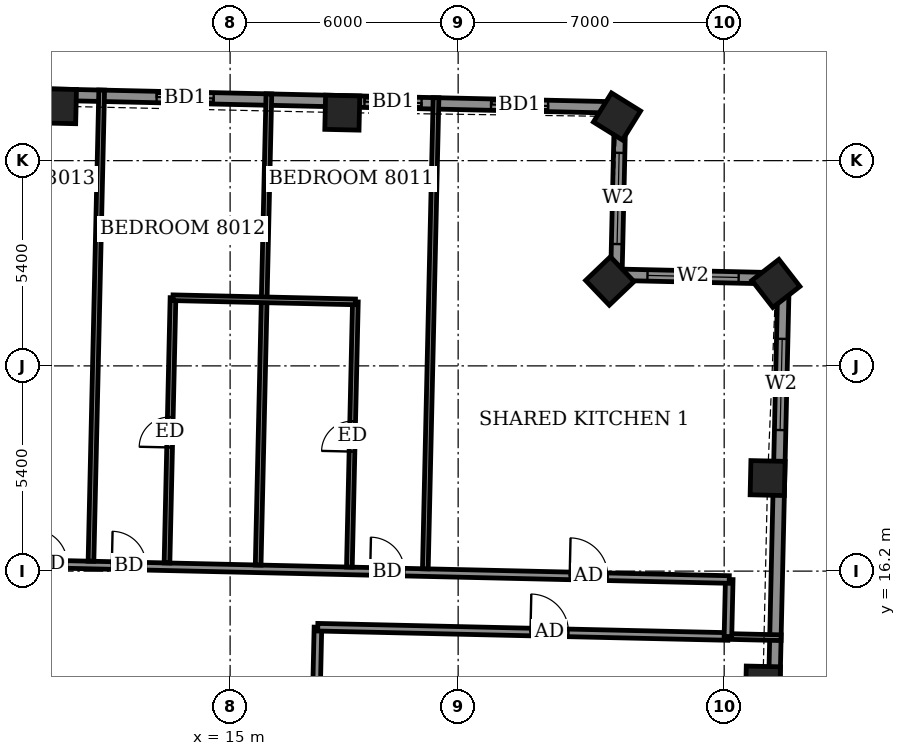
"""IFC4 building model, lengths in metres.
Left out: names, types, materials, properties, quantities, classifications, styles, units other than length and angle.
Written with IfcOpenShell. Run it as: python <this file> out.ifc"""

import sys

from ifc_helpers import new_model, si_unit, direction, frame, frame_2d, origin, origin_2d, place, context, subcontext, project, spatial, rectangle, extrude, element, fill, save


model = new_model("IFC4")
c1 = context("Model", 3, precision=1e-05, world=origin(), true_north=direction((0.0, 1.0)))
c2 = subcontext(c1, "Body", "Model", "MODEL_VIEW")
j1 = project(units=[si_unit("LENGTHUNIT", "METRE"), si_unit("PLANEANGLEUNIT", "RADIAN")], contexts=[c1])
p1 = place(None, origin())
s1 = spatial("IfcSite", under=j1, at=p1, CompositionType="ELEMENT")
p2 = place(p1, origin())
s2 = spatial("IfcBuilding", under=s1, at=p2, CompositionType="ELEMENT")
p3 = place(p2, frame((0.0, 0.0, 313.3)))
s3 = spatial("IfcBuildingStorey", under=s2, at=p3, CompositionType="ELEMENT", Elevation=313.3)
for number, where, z_axis, x_axis in (
    (1, (29.021, 13.242, -0.55), (0.0, 0.0, 1.0), (0.023, 1.0, 0.0)),
    (2, (29.143, 18.648, -0.55), (0.0, 0.0, 1.0), (0.023, 1.0, 0.0)),
    (3, (29.361, 23.769, -0.55), (0.0, 0.0, 1.0), (-0.613, 0.79, 0.0)),
    (4, (24.992, 23.834, -0.55), (0.0, 0.0, 1.0), (-0.691, 0.723, 0.0)),
    (5, (25.18, 28.162, -0.55), (0.0, 0.0, 1.0), (-0.849, 0.528, 0.0)),
    (6, (17.952, 28.263, -0.55), (0.0, 0.0, 1.0), (-1.0, 0.023, 0.0)),
    (7, (10.497, 28.432, -0.55), (0.0, 0.0, 1.0), (-1.0, 0.023, 0.0)),
):
    element("IfcColumn", number, at=place(p3, frame(where, z_axis=z_axis, x_axis=x_axis)), inside=s3, PredefinedType="COLUMN", context=c2, shape_type="SweptSolid", body=[
        extrude(rectangle(XDim=0.9, YDim=0.9, at=origin_2d()), origin(), (0.0, 0.0, 1.0), 3.6),
    ])
p4 = place(p3, frame((29.188, 7.404, 0.0), z_axis=(0.0, 0.0, 1.0), x_axis=(0.022728463996, 0.999741675096, 0.0)))
e8 = element("IfcWall", 8, at=p4, inside=s3, PredefinedType="SOLIDWALL", context=c2, shape_type="SweptSolid", body=[
    extrude(rectangle(XDim=16.499, YDim=0.3, at=frame_2d((8.25, 0.0))), origin(), (0.0, 0.0, 1.0), 2.55),
])
p5 = place(p4, frame((2.379, 0.0, 0.0)))
e9 = element("IfcOpeningElement", 9, at=p5, cuts=e8, PredefinedType="OPENING", context=c2, shape_type="SweptSolid", body=[
    extrude(rectangle(XDim=1.5, YDim=2.4, at=frame_2d((0.75, 1.2))), frame((0.0, 0.16, 0.0), z_axis=(0.0, -1.0, 0.0), x_axis=(1.0, 0.0, 0.0)), (0.0, 0.0, 1.0), 0.32),
])
p6 = place(p4, frame((12.511, 0.0, 0.9)))
e10 = element("IfcOpeningElement", 10, at=p6, cuts=e8, PredefinedType="OPENING", context=c2, shape_type="SweptSolid", body=[
    extrude(rectangle(XDim=2.4, YDim=1.5, at=frame_2d((1.2, 0.75))), frame((0.0, 0.16, 0.0), z_axis=(0.0, -1.0, 0.0), x_axis=(1.0, 0.0, 0.0)), (0.0, 0.0, 1.0), 0.32),
])
p7 = place(p3, frame((29.563, 23.899, 0.0), z_axis=(0.0, 0.0, 1.0), x_axis=(-0.999741204967, 0.022749133868, 0.0)))
e11 = element("IfcWall", 11, at=p7, inside=s3, PredefinedType="SOLIDWALL", context=c2, shape_type="SweptSolid", body=[
    extrude(rectangle(XDim=4.4, YDim=0.3, at=frame_2d((2.2, 0.0))), origin(), (0.0, 0.0, 1.0), 2.55),
])
p8 = place(p7, frame((1.182, 0.0, 0.9)))
e12 = element("IfcOpeningElement", 12, at=p8, cuts=e11, PredefinedType="OPENING", context=c2, shape_type="SweptSolid", body=[
    extrude(rectangle(XDim=2.4, YDim=1.5, at=frame_2d((1.2, 0.75))), frame((0.0, 0.16, 0.0), z_axis=(0.0, -1.0, 0.0), x_axis=(1.0, 0.0, 0.0)), (0.0, 0.0, 1.0), 0.32),
])
p9 = place(p3, frame((25.164, 23.999, 0.0), z_axis=(0.0, 0.0, 1.0), x_axis=(0.02269871331, 0.999742351016, 0.0)))
e13 = element("IfcWall", 13, at=p9, inside=s3, PredefinedType="SOLIDWALL", context=c2, shape_type="SweptSolid", body=[
    extrude(rectangle(XDim=4.399, YDim=0.3, at=frame_2d((2.2, 0.0))), origin(), (0.0, 0.0, 1.0), 2.55),
])
p10 = place(p9, frame((0.807, 0.0, 0.9)))
e14 = element("IfcOpeningElement", 14, at=p10, cuts=e13, PredefinedType="OPENING", context=c2, shape_type="SweptSolid", body=[
    extrude(rectangle(XDim=2.4, YDim=1.5, at=frame_2d((1.2, 0.75))), frame((0.0, 0.16, 0.0), z_axis=(0.0, -1.0, 0.0), x_axis=(1.0, 0.0, 0.0)), (0.0, 0.0, 1.0), 0.32),
])
p11 = place(p3, frame((25.264, 28.397, 0.0), z_axis=(0.0, 0.0, 1.0), x_axis=(-0.999742391375, 0.022696935658, 0.0)))
e15 = element("IfcWall", 15, at=p11, inside=s3, PredefinedType="SOLIDWALL", context=c2, shape_type="SweptSolid", body=[
    extrude(rectangle(XDim=51.9, YDim=0.3, at=frame_2d((25.95, 0.0))), origin(), (0.0, 0.0, 1.0), 2.5),
])
p12 = place(p11, frame((1.898, 0.0, 0.0)))
e16 = element("IfcOpeningElement", 16, at=p12, cuts=e15, PredefinedType="OPENING", context=c2, shape_type="SweptSolid", body=[
    extrude(rectangle(XDim=1.5, YDim=2.4, at=frame_2d((0.75, 1.2))), frame((0.0, 0.16, 0.0), z_axis=(0.0, -1.0, 0.0), x_axis=(1.0, 0.0, 0.0)), (0.0, 0.0, 1.0), 0.32),
])
p13 = place(p11, frame((5.229, 0.0, 0.0)))
e17 = element("IfcOpeningElement", 17, at=p13, cuts=e15, PredefinedType="OPENING", context=c2, shape_type="SweptSolid", body=[
    extrude(rectangle(XDim=1.5, YDim=2.4, at=frame_2d((0.75, 1.2))), frame((0.0, 0.16, 0.0), z_axis=(0.0, -1.0, 0.0), x_axis=(1.0, 0.0, 0.0)), (0.0, 0.0, 1.0), 0.32),
])
p14 = place(p11, frame((10.7, 0.0, 0.0)))
e18 = element("IfcOpeningElement", 18, at=p14, cuts=e15, PredefinedType="OPENING", context=c2, shape_type="SweptSolid", body=[
    extrude(rectangle(XDim=1.5, YDim=2.4, at=frame_2d((0.75, 1.2))), frame((0.0, 0.16, 0.0), z_axis=(0.0, -1.0, 0.0), x_axis=(1.0, 0.0, 0.0)), (0.0, 0.0, 1.0), 0.32),
])
p15 = place(p11, frame((15.832, 0.0, 0.0)))
e19 = element("IfcOpeningElement", 19, at=p15, cuts=e15, PredefinedType="OPENING", context=c2, shape_type="SweptSolid", body=[
    extrude(rectangle(XDim=1.5, YDim=2.4, at=frame_2d((0.75, 1.2))), frame((0.0, 0.16, 0.0), z_axis=(0.0, -1.0, 0.0), x_axis=(1.0, 0.0, 0.0)), (0.0, 0.0, 1.0), 0.32),
])
p16 = place(p11, frame((19.361, 0.0, 0.0)))
e20 = element("IfcOpeningElement", 20, at=p16, cuts=e15, PredefinedType="OPENING", context=c2, shape_type="SweptSolid", body=[
    extrude(rectangle(XDim=1.5, YDim=2.4, at=frame_2d((0.75, 1.2))), frame((0.0, 0.16, 0.0), z_axis=(0.0, -1.0, 0.0), x_axis=(1.0, 0.0, 0.0)), (0.0, 0.0, 1.0), 0.32),
])
p17 = place(p11, frame((24.1, 0.0, 0.0)))
e21 = element("IfcOpeningElement", 21, at=p17, cuts=e15, PredefinedType="OPENING", context=c2, shape_type="SweptSolid", body=[
    extrude(rectangle(XDim=1.5, YDim=2.4, at=frame_2d((0.75, 1.2))), frame((0.0, 0.16, 0.0), z_axis=(0.0, -1.0, 0.0), x_axis=(1.0, 0.0, 0.0)), (0.0, 0.0, 1.0), 0.32),
])
p18 = place(p11, frame((27.539, 0.0, 0.0)))
e22 = element("IfcOpeningElement", 22, at=p18, cuts=e15, PredefinedType="OPENING", context=c2, shape_type="SweptSolid", body=[
    extrude(rectangle(XDim=1.5, YDim=2.4, at=frame_2d((0.75, 1.2))), frame((0.0, 0.16, 0.0), z_axis=(0.0, -1.0, 0.0), x_axis=(1.0, 0.0, 0.0)), (0.0, 0.0, 1.0), 0.32),
])
p19 = place(p11, frame((33.6, 0.0, 0.0)))
e23 = element("IfcOpeningElement", 23, at=p19, cuts=e15, PredefinedType="OPENING", context=c2, shape_type="SweptSolid", body=[
    extrude(rectangle(XDim=1.5, YDim=2.4, at=frame_2d((0.75, 1.2))), frame((0.0, 0.16, 0.0), z_axis=(0.0, -1.0, 0.0), x_axis=(1.0, 0.0, 0.0)), (0.0, 0.0, 1.0), 0.32),
])
p20 = place(p11, frame((38.643, 0.0, 0.0)))
e24 = element("IfcOpeningElement", 24, at=p20, cuts=e15, PredefinedType="OPENING", context=c2, shape_type="SweptSolid", body=[
    extrude(rectangle(XDim=1.5, YDim=2.4, at=frame_2d((0.75, 1.2))), frame((0.0, 0.16, 0.0), z_axis=(0.0, -1.0, 0.0), x_axis=(1.0, 0.0, 0.0)), (0.0, 0.0, 1.0), 0.32),
])
p21 = place(p11, frame((42.171, 0.0, 0.0)))
e25 = element("IfcOpeningElement", 25, at=p21, cuts=e15, PredefinedType="OPENING", context=c2, shape_type="SweptSolid", body=[
    extrude(rectangle(XDim=1.5, YDim=2.4, at=frame_2d((0.75, 1.2))), frame((0.0, 0.16, 0.0), z_axis=(0.0, -1.0, 0.0), x_axis=(1.0, 0.0, 0.0)), (0.0, 0.0, 1.0), 0.32),
])
p22 = place(p11, frame((47.637, 0.0, 0.9)))
e26 = element("IfcOpeningElement", 26, at=p22, cuts=e15, PredefinedType="OPENING", context=c2, shape_type="SweptSolid", body=[
    extrude(rectangle(XDim=2.4, YDim=1.5, at=frame_2d((1.2, 0.75))), frame((0.0, 0.16, 0.0), z_axis=(0.0, -1.0, 0.0), x_axis=(1.0, 0.0, 0.0)), (0.0, 0.0, 1.0), 0.32),
])
p23 = place(p3, frame((17.157, 7.898, 0.0), z_axis=(0.0, 0.0, 1.0), x_axis=(0.022562209343, 0.999745440955, 0.0)))
e27 = element("IfcWall", 27, at=p23, inside=s3, PredefinedType="PARTITIONING", context=c2, shape_type="SweptSolid", body=[
    extrude(rectangle(XDim=6.828, YDim=0.2, at=frame_2d((3.414, 0.0))), origin(), (0.0, 0.0, 1.0), 3.05),
])
p24 = place(p3, frame((17.306, 14.724, 0.0), z_axis=(0.0, 0.0, 1.0), x_axis=(0.999744269809, -0.022614043969, 0.0)))
e28 = element("IfcWall", 28, at=p24, inside=s3, PredefinedType="PARTITIONING", context=c2, shape_type="SweptSolid", body=[
    extrude(rectangle(XDim=10.796, YDim=0.2, at=frame_2d((5.398, 0.0))), origin(), (0.0, 0.0, 1.0), 3.05),
])
p25 = place(p24, frame((5.598, 0.0, 0.0)))
e29 = element("IfcOpeningElement", 29, at=p25, cuts=e28, PredefinedType="OPENING", context=c2, shape_type="SweptSolid", body=[
    extrude(rectangle(XDim=1.0, YDim=2.1, at=frame_2d((0.5, 1.05))), frame((0.0, 0.11, 0.0), z_axis=(0.0, -1.0, 0.0), x_axis=(1.0, 0.0, 0.0)), (0.0, 0.0, 1.0), 0.22),
])
p26 = place(p3, frame((28.099, 14.48, 0.0), z_axis=(0.0, 0.0, 1.0), x_axis=(0.999738763928, -0.022856156732, 0.0)))
e30 = element("IfcWall", 30, at=p26, inside=s3, PredefinedType="PARTITIONING", context=c2, shape_type="SweptSolid", body=[
    extrude(rectangle(XDim=1.399, YDim=0.15, at=frame_2d((0.7, 0.0))), origin(), (0.0, 0.0, 1.0), 2.55),
])
p27 = place(p3, frame((28.099, 14.48, 0.0), z_axis=(0.0, 0.0, 1.0), x_axis=(0.022632637625, 0.99974384905, 0.0)))
e31 = element("IfcWall", 31, at=p27, inside=s3, PredefinedType="PARTITIONING", context=c2, shape_type="SweptSolid", body=[
    extrude(rectangle(XDim=1.5, YDim=0.2, at=frame_2d((0.75, 0.0))), origin(), (0.0, 0.0, 1.0), 3.05),
])
p28 = place(p3, frame((-30.652, 17.313, 0.0), z_axis=(0.0, 0.0, 1.0), x_axis=(0.999742623764, -0.02268669719, 0.0)))
e32 = element("IfcWall", 32, at=p28, inside=s3, PredefinedType="PARTITIONING", context=c2, shape_type="SweptSolid", body=[
    extrude(rectangle(XDim=58.8, YDim=0.2, at=frame_2d((29.4, 0.0))), origin(), (0.0, 0.0, 1.0), 3.05),
])
p29 = place(p28, frame((54.601, 0.0, 0.0)))
e33 = element("IfcOpeningElement", 33, at=p29, cuts=e32, PredefinedType="OPENING", context=c2, shape_type="SweptSolid", body=[
    extrude(rectangle(XDim=1.0, YDim=2.1, at=frame_2d((0.5, 1.05))), frame((0.0, 0.11, 0.0), z_axis=(0.0, -1.0, 0.0), x_axis=(1.0, 0.0, 0.0)), (0.0, 0.0, 1.0), 0.22),
])
p30 = place(p28, frame((49.35, 0.0, 0.0)))
e34 = element("IfcOpeningElement", 34, at=p30, cuts=e32, PredefinedType="OPENING", context=c2, shape_type="SweptSolid", body=[
    extrude(rectangle(XDim=0.9, YDim=2.1, at=frame_2d((0.45, 1.05))), frame((0.0, 0.11, 0.0), z_axis=(0.0, -1.0, 0.0), x_axis=(1.0, 0.0, 0.0)), (0.0, 0.0, 1.0), 0.22),
])
p31 = place(p28, frame((42.55, 0.0, 0.0)))
e35 = element("IfcOpeningElement", 35, at=p31, cuts=e32, PredefinedType="OPENING", context=c2, shape_type="SweptSolid", body=[
    extrude(rectangle(XDim=0.9, YDim=2.1, at=frame_2d((0.45, 1.05))), frame((0.0, 0.11, 0.0), z_axis=(0.0, -1.0, 0.0), x_axis=(1.0, 0.0, 0.0)), (0.0, 0.0, 1.0), 0.22),
])
p32 = place(p28, frame((40.475, 0.0, 0.0)))
e36 = element("IfcOpeningElement", 36, at=p32, cuts=e32, PredefinedType="OPENING", context=c2, shape_type="SweptSolid", body=[
    extrude(rectangle(XDim=0.9, YDim=2.1, at=frame_2d((0.45, 1.05))), frame((0.0, 0.11, 0.0), z_axis=(0.0, -1.0, 0.0), x_axis=(1.0, 0.0, 0.0)), (0.0, 0.0, 1.0), 0.22),
])
p33 = place(p28, frame((33.6, 0.0, 0.0)))
e37 = element("IfcOpeningElement", 37, at=p33, cuts=e32, PredefinedType="OPENING", context=c2, shape_type="SweptSolid", body=[
    extrude(rectangle(XDim=0.9, YDim=2.1, at=frame_2d((0.45, 1.05))), frame((0.0, 0.11, 0.0), z_axis=(0.0, -1.0, 0.0), x_axis=(1.0, 0.0, 0.0)), (0.0, 0.0, 1.0), 0.22),
])
p34 = place(p28, frame((31.55, 0.0, 0.0)))
e38 = element("IfcOpeningElement", 38, at=p34, cuts=e32, PredefinedType="OPENING", context=c2, shape_type="SweptSolid", body=[
    extrude(rectangle(XDim=0.9, YDim=2.1, at=frame_2d((0.45, 1.05))), frame((0.0, 0.11, 0.0), z_axis=(0.0, -1.0, 0.0), x_axis=(1.0, 0.0, 0.0)), (0.0, 0.0, 1.0), 0.22),
])
p35 = place(p28, frame((24.425, 0.0, 0.0)))
e39 = element("IfcOpeningElement", 39, at=p35, cuts=e32, PredefinedType="OPENING", context=c2, shape_type="SweptSolid", body=[
    extrude(rectangle(XDim=0.9, YDim=2.1, at=frame_2d((0.45, 1.05))), frame((0.0, 0.11, 0.0), z_axis=(0.0, -1.0, 0.0), x_axis=(1.0, 0.0, 0.0)), (0.0, 0.0, 1.0), 0.22),
])
p36 = place(p28, frame((22.05, 0.0, 0.0)))
e40 = element("IfcOpeningElement", 40, at=p36, cuts=e32, PredefinedType="OPENING", context=c2, shape_type="SweptSolid", body=[
    extrude(rectangle(XDim=0.9, YDim=2.1, at=frame_2d((0.45, 1.05))), frame((0.0, 0.11, 0.0), z_axis=(0.0, -1.0, 0.0), x_axis=(1.0, 0.0, 0.0)), (0.0, 0.0, 1.0), 0.22),
])
p37 = place(p28, frame((14.95, 0.0, 0.0)))
e41 = element("IfcOpeningElement", 41, at=p37, cuts=e32, PredefinedType="OPENING", context=c2, shape_type="SweptSolid", body=[
    extrude(rectangle(XDim=0.9, YDim=2.1, at=frame_2d((0.45, 1.05))), frame((0.0, 0.11, 0.0), z_axis=(0.0, -1.0, 0.0), x_axis=(1.0, 0.0, 0.0)), (0.0, 0.0, 1.0), 0.22),
])
p38 = place(p28, frame((12.525, 0.0, 0.0)))
e42 = element("IfcOpeningElement", 42, at=p38, cuts=e32, PredefinedType="OPENING", context=c2, shape_type="SweptSolid", body=[
    extrude(rectangle(XDim=0.9, YDim=2.1, at=frame_2d((0.45, 1.05))), frame((0.0, 0.11, 0.0), z_axis=(0.0, -1.0, 0.0), x_axis=(1.0, 0.0, 0.0)), (0.0, 0.0, 1.0), 0.22),
])
p39 = place(p28, frame((4.032, 0.0, 0.0)))
e43 = element("IfcOpeningElement", 43, at=p39, cuts=e32, PredefinedType="OPENING", context=c2, shape_type="SweptSolid", body=[
    extrude(rectangle(XDim=1.0, YDim=2.1, at=frame_2d((0.5, 1.05))), frame((0.0, 0.11, 0.0), z_axis=(0.0, -1.0, 0.0), x_axis=(1.0, 0.0, 0.0)), (0.0, 0.0, 1.0), 0.22),
])
p40 = place(p3, frame((11.339, 16.46, 0.0), z_axis=(0.0, 0.0, 1.0), x_axis=(0.022740189192, 0.999741408463, 0.0)))
e44 = element("IfcWall", 44, at=p40, inside=s3, PredefinedType="PARTITIONING", context=c2, shape_type="SweptSolid", body=[
    extrude(rectangle(XDim=12.4, YDim=0.15, at=frame_2d((6.2, 0.0))), origin(), (0.0, 0.0, 1.0), 2.5),
])
p41 = place(p3, frame((13.339, 16.415, 0.0), z_axis=(0.0, 0.0, 1.0), x_axis=(0.022630826984, 0.999743890039, 0.0)))
e45 = element("IfcWall", 45, at=p41, inside=s3, PredefinedType="PARTITIONING", context=c2, shape_type="SweptSolid", body=[
    extrude(rectangle(XDim=6.98, YDim=0.15, at=frame_2d((3.49, 0.0))), origin(), (0.0, 0.0, 1.0), 3.05),
])
p42 = place(p41, frame((3.04, 0.0, 0.0)))
e46 = element("IfcOpeningElement", 46, at=p42, cuts=e45, PredefinedType="OPENING", context=c2, shape_type="SweptSolid", body=[
    extrude(rectangle(XDim=0.8, YDim=2.1, at=frame_2d((0.4, 1.05))), frame((0.0, 0.085, 0.0), z_axis=(0.0, -1.0, 0.0), x_axis=(1.0, 0.0, 0.0)), (0.0, 0.0, 1.0), 0.17),
])
p43 = place(p3, frame((15.738, 16.36, 0.0), z_axis=(0.0, 0.0, 1.0), x_axis=(0.022740189192, 0.999741408463, 0.0)))
e47 = element("IfcWall", 47, at=p43, inside=s3, PredefinedType="PARTITIONING", context=c2, shape_type="SweptSolid", body=[
    extrude(rectangle(XDim=12.4, YDim=0.15, at=frame_2d((6.2, 0.0))), origin(), (0.0, 0.0, 1.0), 2.5),
])
p44 = place(p3, frame((18.138, 16.306, 0.0), z_axis=(0.0, 0.0, 1.0), x_axis=(0.022630826984, 0.999743890039, 0.0)))
e48 = element("IfcWall", 48, at=p44, inside=s3, PredefinedType="PARTITIONING", context=c2, shape_type="SweptSolid", body=[
    extrude(rectangle(XDim=6.98, YDim=0.15, at=frame_2d((3.49, 0.0))), origin(), (0.0, 0.0, 1.0), 3.05),
])
p45 = place(p44, frame((3.04, 0.0, 0.0)))
e49 = element("IfcOpeningElement", 49, at=p45, cuts=e48, PredefinedType="OPENING", context=c2, shape_type="SweptSolid", body=[
    extrude(rectangle(XDim=0.8, YDim=2.1, at=frame_2d((0.4, 1.05))), frame((0.0, 0.085, 0.0), z_axis=(0.0, -1.0, 0.0), x_axis=(1.0, 0.0, 0.0)), (0.0, 0.0, 1.0), 0.17),
])
p46 = place(p3, frame((20.137, 16.261, 0.0), z_axis=(0.0, 0.0, 1.0), x_axis=(0.022663260168, 0.999743155335, 0.0)))
e50 = element("IfcWall", 50, at=p46, inside=s3, PredefinedType="PARTITIONING", context=c2, shape_type="SweptSolid", body=[
    extrude(rectangle(XDim=12.399, YDim=0.15, at=frame_2d((6.2, 0.0))), origin(), (0.0, 0.0, 1.0), 2.5),
])
p47 = place(p3, frame((13.497, 23.393, 0.0), z_axis=(0.0, 0.0, 1.0), x_axis=(0.999741520352, -0.022735269617, 0.0)))
e51 = element("IfcWall", 51, at=p47, inside=s3, PredefinedType="PARTITIONING", context=c2, shape_type="SweptSolid", body=[
    extrude(rectangle(XDim=4.8, YDim=0.15, at=frame_2d((2.4, 0.0))), origin(), (0.0, 0.0, 1.0), 3.05),
])
p48 = place(p6, origin())
e52 = element("IfcWindow", 52, at=p48, inside=s3, PartitioningType="DOUBLE_PANEL_VERTICAL", PredefinedType="WINDOW", context=c2, shape_type="SweptSolid", body=[
    extrude(rectangle(XDim=2.4, YDim=1.5, at=frame_2d((1.2, 0.75))), frame((0.0, 0.03, 0.0), z_axis=(0.0, -1.0, 0.0), x_axis=(1.0, 0.0, 0.0)), (0.0, 0.0, 1.0), 0.06),
])
fill(e10, e52)
p49 = place(p8, origin())
e53 = element("IfcWindow", 53, at=p49, inside=s3, PartitioningType="DOUBLE_PANEL_VERTICAL", PredefinedType="WINDOW", context=c2, shape_type="SweptSolid", body=[
    extrude(rectangle(XDim=2.4, YDim=1.5, at=frame_2d((1.2, 0.75))), frame((0.0, 0.03, 0.0), z_axis=(0.0, -1.0, 0.0), x_axis=(1.0, 0.0, 0.0)), (0.0, 0.0, 1.0), 0.06),
])
fill(e12, e53)
p50 = place(p10, origin())
e54 = element("IfcWindow", 54, at=p50, inside=s3, PartitioningType="DOUBLE_PANEL_VERTICAL", PredefinedType="WINDOW", context=c2, shape_type="SweptSolid", body=[
    extrude(rectangle(XDim=2.4, YDim=1.5, at=frame_2d((1.2, 0.75))), frame((0.0, 0.03, 0.0), z_axis=(0.0, -1.0, 0.0), x_axis=(1.0, 0.0, 0.0)), (0.0, 0.0, 1.0), 0.06),
])
fill(e14, e54)
p51 = place(p12, origin())
e55 = element("IfcDoor", 55, at=p51, inside=s3, OperationType="SLIDING_TO_LEFT", PredefinedType="DOOR", context=c2, shape_type="SweptSolid", body=[
    extrude(rectangle(XDim=1.5, YDim=2.4, at=frame_2d((0.75, 1.2))), frame((0.0, 0.025, 0.0), z_axis=(0.0, -1.0, 0.0), x_axis=(1.0, 0.0, 0.0)), (0.0, 0.0, 1.0), 0.05),
])
fill(e16, e55)
p52 = place(p13, origin())
e56 = element("IfcDoor", 56, at=p52, inside=s3, OperationType="SLIDING_TO_LEFT", PredefinedType="DOOR", context=c2, shape_type="SweptSolid", body=[
    extrude(rectangle(XDim=1.5, YDim=2.4, at=frame_2d((0.75, 1.2))), frame((0.0, 0.025, 0.0), z_axis=(0.0, -1.0, 0.0), x_axis=(1.0, 0.0, 0.0)), (0.0, 0.0, 1.0), 0.05),
])
fill(e17, e56)
p53 = place(p14, origin())
e57 = element("IfcDoor", 57, at=p53, inside=s3, OperationType="SLIDING_TO_LEFT", PredefinedType="DOOR", context=c2, shape_type="SweptSolid", body=[
    extrude(rectangle(XDim=1.5, YDim=2.4, at=frame_2d((0.75, 1.2))), frame((0.0, 0.025, 0.0), z_axis=(0.0, -1.0, 0.0), x_axis=(1.0, 0.0, 0.0)), (0.0, 0.0, 1.0), 0.05),
])
fill(e18, e57)
p54 = place(p25, origin())
e58 = element("IfcDoor", 58, at=p54, inside=s3, OperationType="SINGLE_SWING_RIGHT", PredefinedType="DOOR", context=c2, shape_type="SweptSolid", body=[
    extrude(rectangle(XDim=1.0, YDim=2.1, at=frame_2d((0.5, 1.05))), frame((0.0, 0.025, 0.0), z_axis=(0.0, -1.0, 0.0), x_axis=(1.0, 0.0, 0.0)), (0.0, 0.0, 1.0), 0.05),
])
fill(e29, e58)
p55 = place(p29, origin())
e59 = element("IfcDoor", 59, at=p55, inside=s3, OperationType="SINGLE_SWING_LEFT", PredefinedType="DOOR", context=c2, shape_type="SweptSolid", body=[
    extrude(rectangle(XDim=1.0, YDim=2.1, at=frame_2d((0.5, 1.05))), frame((0.0, 0.025, 0.0), z_axis=(0.0, -1.0, 0.0), x_axis=(1.0, 0.0, 0.0)), (0.0, 0.0, 1.0), 0.05),
])
fill(e33, e59)
p56 = place(p30, origin())
e60 = element("IfcDoor", 60, at=p56, inside=s3, OperationType="SINGLE_SWING_LEFT", PredefinedType="DOOR", context=c2, shape_type="SweptSolid", body=[
    extrude(rectangle(XDim=0.9, YDim=2.1, at=frame_2d((0.45, 1.05))), frame((0.0, 0.025, 0.0), z_axis=(0.0, -1.0, 0.0), x_axis=(1.0, 0.0, 0.0)), (0.0, 0.0, 1.0), 0.05),
])
fill(e34, e60)
p57 = place(p45, origin())
e61 = element("IfcDoor", 61, at=p57, inside=s3, OperationType="SINGLE_SWING_LEFT", PredefinedType="DOOR", context=c2, shape_type="SweptSolid", body=[
    extrude(rectangle(XDim=0.8, YDim=2.1, at=frame_2d((0.4, 1.05))), frame((0.0, 0.025, 0.0), z_axis=(0.0, -1.0, 0.0), x_axis=(1.0, 0.0, 0.0)), (0.0, 0.0, 1.0), 0.05),
])
fill(e49, e61)
p58 = place(p31, origin())
e62 = element("IfcDoor", 62, at=p58, inside=s3, OperationType="SINGLE_SWING_RIGHT", PredefinedType="DOOR", context=c2, shape_type="SweptSolid", body=[
    extrude(rectangle(XDim=0.9, YDim=2.1, at=frame_2d((0.45, 1.05))), frame((0.0, 0.025, 0.0), z_axis=(0.0, -1.0, 0.0), x_axis=(1.0, 0.0, 0.0)), (0.0, 0.0, 1.0), 0.05),
])
fill(e35, e62)
p59 = place(p42, origin())
e63 = element("IfcDoor", 63, at=p59, inside=s3, OperationType="SINGLE_SWING_RIGHT", PredefinedType="DOOR", context=c2, shape_type="SweptSolid", body=[
    extrude(rectangle(XDim=0.8, YDim=2.1, at=frame_2d((0.4, 1.05))), frame((0.0, 0.025, 0.0), z_axis=(0.0, -1.0, 0.0), x_axis=(1.0, 0.0, 0.0)), (0.0, 0.0, 1.0), 0.05),
])
fill(e46, e63)
p60 = place(p32, origin())
e64 = element("IfcDoor", 64, at=p60, inside=s3, OperationType="SINGLE_SWING_LEFT", PredefinedType="DOOR", context=c2, shape_type="SweptSolid", body=[
    extrude(rectangle(XDim=0.9, YDim=2.1, at=frame_2d((0.45, 1.05))), frame((0.0, 0.025, 0.0), z_axis=(0.0, -1.0, 0.0), x_axis=(1.0, 0.0, 0.0)), (0.0, 0.0, 1.0), 0.05),
])
fill(e36, e64)
save(model, sys.argv[1])
